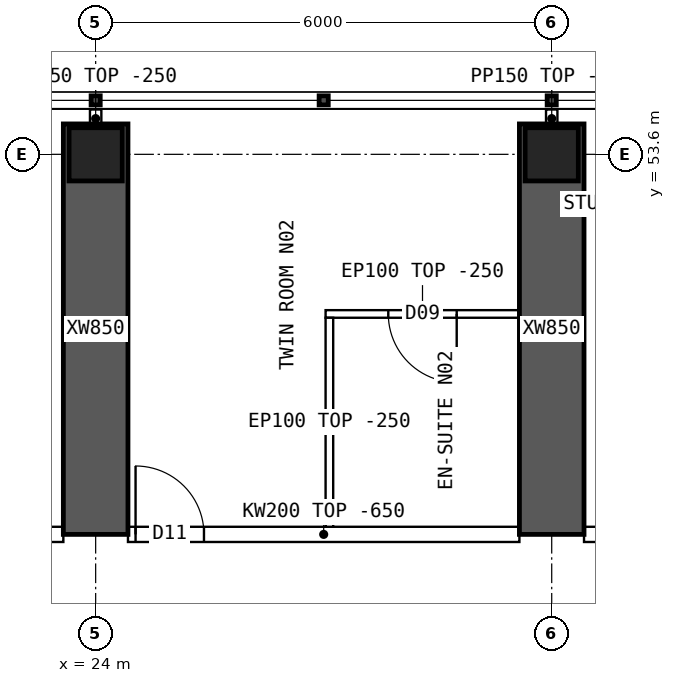
"""IFC4 building model, lengths in metres.
Left out: names, types, materials, properties, quantities, classifications, styles, units other than length and angle.
Written with IfcOpenShell. Run it as: python <this file> out.ifc"""

import sys

from ifc_helpers import new_model, si_unit, direction, frame, frame_2d, origin, origin_2d, place, context, subcontext, project, spatial, polyline, rectangle, hollow_rectangle, outline, extrude, element, fill, save


model = new_model("IFC4")
c1 = context("Model", 3, precision=1e-05, world=origin(), true_north=direction((0.0, 1.0)))
c2 = subcontext(c1, "Body", "Model", "MODEL_VIEW")
j1 = project(units=[si_unit("LENGTHUNIT", "METRE"), si_unit("PLANEANGLEUNIT", "RADIAN")], contexts=[c1])
p1 = place(None, origin())
s1 = spatial("IfcSite", under=j1, at=p1, CompositionType="ELEMENT")
p2 = place(p1, origin())
s2 = spatial("IfcBuilding", under=s1, at=p2, CompositionType="ELEMENT")
p3 = place(p2, frame((0.0, 0.0, 171.1)))
s3 = spatial("IfcBuildingStorey", under=s2, at=p3, CompositionType="ELEMENT", Elevation=171.1)
for number, where, z_axis, x_axis in (
    (1, (24.0, 53.6, 0.0), (0.0, 0.0, 1.0), (1.0, 0.0, 0.0)),
    (2, (30.0, 53.6, 0.0), (0.0, 0.0, 1.0), (1.0, 0.0, 0.0)),
):
    element("IfcColumn", number, at=place(p3, frame(where, z_axis=z_axis, x_axis=x_axis)), inside=s3, PredefinedType="COLUMN", context=c2, shape_type="SweptSolid", body=[
        extrude(hollow_rectangle(XDim=0.7, YDim=0.7, WallThickness=0.07, at=origin_2d()), origin(), (0.0, 0.0, 1.0), 3.75),
    ])
for number, where, z_axis, x_axis in (
    (3, (24.0, 48.6, 0.0), (0.0, 0.0, 1.0), (0.0, 1.0, 0.0)),
    (4, (30.0, 48.6, 0.0), (0.0, 0.0, 1.0), (0.0, 1.0, 0.0)),
):
    element("IfcWall", number, at=place(p3, frame(where, z_axis=z_axis, x_axis=x_axis)), inside=s3, PredefinedType="SHEAR", context=c2, shape_type="SweptSolid", body=[
        extrude(rectangle(XDim=5.4, YDim=0.85, at=frame_2d((2.7, 0.0))), origin(), (0.0, 0.0, 1.0), 3.75),
    ])
p4 = place(p3, frame((18.425, 48.6, 0.0), z_axis=(0.0, 0.0, 1.0), x_axis=(1.0, 0.0, 0.0)))
e5 = element("IfcWall", 5, at=p4, inside=s3, PredefinedType="SOLIDWALL", context=c2, shape_type="SweptSolid", body=[
    extrude(outline(polyline([(0.0, 0.0), (5.15, 0.0), (5.15, 3.1), (0.0, 3.1), (0.0, 0.0)])), frame((0.0, 0.1, 0.0), z_axis=(0.0, -1.0, 0.0), x_axis=(1.0, 0.0, 0.0)), (0.0, 0.0, 1.0), 0.2),
])
p5 = place(p4, frame((0.6, 0.0, 0.0)))
e6 = element("IfcOpeningElement", 6, at=p5, cuts=e5, PredefinedType="OPENING", context=c2, shape_type="SweptSolid", body=[
    extrude(rectangle(XDim=1.0, YDim=2.1, at=frame_2d((0.5, 1.05))), frame((0.0, 0.11, 0.0), z_axis=(0.0, -1.0, 0.0), x_axis=(1.0, 0.0, 0.0)), (0.0, 0.0, 1.0), 0.22),
])
p6 = place(p3, frame((24.425, 48.6, 0.0), z_axis=(0.0, 0.0, 1.0), x_axis=(1.0, 0.0, 0.0)))
e7 = element("IfcWall", 7, at=p6, inside=s3, PredefinedType="SOLIDWALL", context=c2, shape_type="SweptSolid", body=[
    extrude(outline(polyline([(0.0, 0.0), (5.15, 0.0), (5.15, 3.1), (0.0, 3.1), (0.0, 0.0)])), frame((0.0, 0.1, 0.0), z_axis=(0.0, -1.0, 0.0), x_axis=(1.0, 0.0, 0.0)), (0.0, 0.0, 1.0), 0.2),
])
p7 = place(p6, frame((0.1, 0.0, 0.0)))
e8 = element("IfcOpeningElement", 8, at=p7, cuts=e7, PredefinedType="OPENING", context=c2, shape_type="SweptSolid", body=[
    extrude(rectangle(XDim=0.9, YDim=2.1, at=frame_2d((0.45, 1.05))), frame((0.0, 0.11, 0.0), z_axis=(0.0, -1.0, 0.0), x_axis=(1.0, 0.0, 0.0)), (0.0, 0.0, 1.0), 0.22),
])
p8 = place(p3, frame((30.425, 48.6, 0.0), z_axis=(0.0, 0.0, 1.0), x_axis=(1.0, 0.0, 0.0)))
e9 = element("IfcWall", 9, at=p8, inside=s3, PredefinedType="SOLIDWALL", context=c2, shape_type="SweptSolid", body=[
    extrude(outline(polyline([(0.0, 0.0), (5.15, 0.0), (5.15, 3.1), (0.0, 3.1), (0.0, 0.0)])), frame((0.0, 0.1, 0.0), z_axis=(0.0, -1.0, 0.0), x_axis=(1.0, 0.0, 0.0)), (0.0, 0.0, 1.0), 0.2),
])
p9 = place(p8, frame((2.3, 0.0, 0.0)))
e10 = element("IfcOpeningElement", 10, at=p9, cuts=e9, PredefinedType="OPENING", context=c2, shape_type="SweptSolid", body=[
    extrude(rectangle(XDim=0.9, YDim=2.1, at=frame_2d((0.45, 1.05))), frame((0.0, 0.11, 0.0), z_axis=(0.0, -1.0, 0.0), x_axis=(1.0, 0.0, 0.0)), (0.0, 0.0, 1.0), 0.22),
])
p10 = place(p3, frame((27.025, 51.5, 0.0), z_axis=(0.0, 0.0, 1.0), x_axis=(1.0, 0.0, 0.0)))
e11 = element("IfcWall", 11, at=p10, inside=s3, PredefinedType="PARTITIONING", context=c2, shape_type="SweptSolid", body=[
    extrude(rectangle(XDim=2.55, YDim=0.1, at=frame_2d((1.275, 0.0))), origin(), (0.0, 0.0, 1.0), 3.5),
])
p11 = place(p10, frame((0.825, 0.0, 0.0)))
e12 = element("IfcOpeningElement", 12, at=p11, cuts=e11, PredefinedType="OPENING", context=c2, shape_type="SweptSolid", body=[
    extrude(rectangle(XDim=0.9, YDim=2.1, at=frame_2d((0.45, 1.05))), frame((0.0, 0.06, 0.0), z_axis=(0.0, -1.0, 0.0), x_axis=(1.0, 0.0, 0.0)), (0.0, 0.0, 1.0), 0.12),
])
p12 = place(p3, frame((27.075, 51.45, 0.0), z_axis=(0.0, 0.0, 1.0), x_axis=(0.0, -1.0, 0.0)))
e13 = element("IfcWall", 13, at=p12, inside=s3, PredefinedType="PARTITIONING", context=c2, shape_type="SweptSolid", body=[
    extrude(outline(polyline([(0.0, 0.0), (2.75, 0.0), (2.75, 3.1), (2.702, 3.1), (2.7, 3.5), (0.0, 3.5), (0.0, 0.0)])), frame((0.0, 0.05, 0.0), z_axis=(0.0, -1.0, 0.0), x_axis=(1.0, 0.0, 0.0)), (0.0, 0.0, 1.0), 0.1),
])
for number, where, z_axis, x_axis in (
    (14, (24.0, 53.95, 0.0), (0.0, 0.0, 1.0), (0.0, 1.0, 0.0)),
    (15, (30.0, 53.95, 0.0), (0.0, 0.0, 1.0), (0.0, 1.0, 0.0)),
):
    element("IfcWall", number, at=place(p3, frame(where, z_axis=z_axis, x_axis=x_axis)), inside=s3, PredefinedType="PARTITIONING", context=c2, shape_type="SweptSolid", body=[
        extrude(rectangle(XDim=0.24, YDim=0.15, at=frame_2d((0.12, 0.0))), origin(), (0.0, 0.0, 1.0), 3.5),
    ])
p13 = place(p11, origin())
e16 = element("IfcDoor", 16, at=p13, inside=s3, OperationType="SINGLE_SWING_RIGHT", PredefinedType="DOOR", context=c2, shape_type="SweptSolid", body=[
    extrude(rectangle(XDim=0.9, YDim=2.1, at=frame_2d((0.45, 1.05))), frame((0.0, 0.025, 0.0), z_axis=(0.0, -1.0, 0.0), x_axis=(1.0, 0.0, 0.0)), (0.0, 0.0, 1.0), 0.05),
])
fill(e12, e16)
p14 = place(p7, origin())
e17 = element("IfcDoor", 17, at=p14, inside=s3, OperationType="SINGLE_SWING_LEFT", PredefinedType="DOOR", context=c2, shape_type="SweptSolid", body=[
    extrude(rectangle(XDim=0.9, YDim=2.1, at=frame_2d((0.45, 1.05))), frame((0.0, 0.025, 0.0), z_axis=(0.0, -1.0, 0.0), x_axis=(1.0, 0.0, 0.0)), (0.0, 0.0, 1.0), 0.05),
])
fill(e8, e17)
save(model, sys.argv[1])
